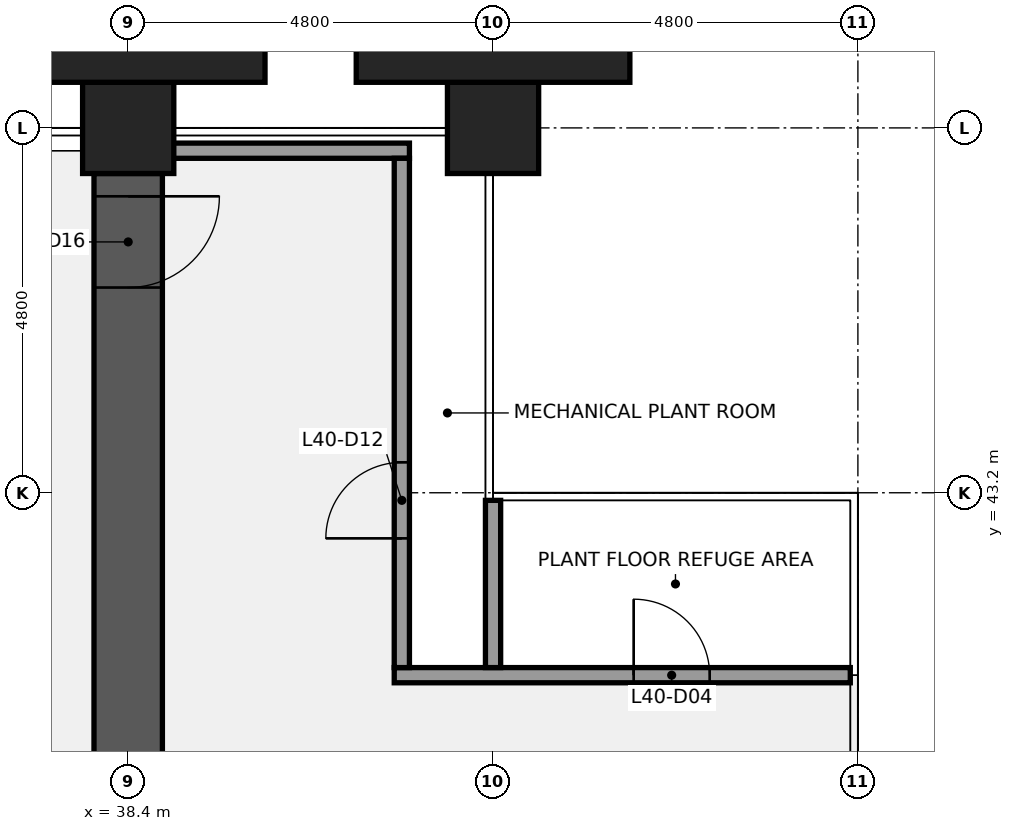
"""IFC4 building model, lengths in metres.
Left out: names, types, materials, properties, quantities, classifications, styles, units other than length and angle.
Written with IfcOpenShell. Run it as: python <this file> out.ifc"""

import sys

from ifc_helpers import new_model, si_unit, direction, frame, frame_2d, origin, origin_2d, place, context, subcontext, project, spatial, rectangle, extrude, element, fill, save


model = new_model("IFC4")
c1 = context("Model", 3, precision=1e-05, world=origin(), true_north=direction((0.0, 1.0)))
c2 = subcontext(c1, "Body", "Model", "MODEL_VIEW")
j1 = project(units=[si_unit("LENGTHUNIT", "METRE"), si_unit("PLANEANGLEUNIT", "RADIAN")], contexts=[c1])
p1 = place(None, origin())
s1 = spatial("IfcSite", under=j1, at=p1, CompositionType="ELEMENT")
p2 = place(p1, origin())
s2 = spatial("IfcBuilding", under=s1, at=p2, CompositionType="ELEMENT")
p3 = place(p2, frame((0.0, 0.0, 180.6)))
s3 = spatial("IfcBuildingStorey", under=s2, at=p3, CompositionType="ELEMENT", Elevation=180.6)
for number, where, z_axis, x_axis in (
    (1, (38.4, 48.0, 0.0), (0.0, 0.0, 1.0), (1.0, 0.0, 0.0)),
    (2, (43.2, 48.0, 0.0), (0.0, 0.0, 1.0), (1.0, 0.0, 0.0)),
):
    element("IfcColumn", number, at=place(p3, frame(where, z_axis=z_axis, x_axis=x_axis)), inside=s3, PredefinedType="COLUMN", context=c2, shape_type="SweptSolid", body=[
        extrude(rectangle(XDim=1.2, YDim=1.2, at=origin_2d()), origin(), (0.0, 0.0, 1.0), 12.6),
    ])
p4 = place(p3, frame((38.4, 38.4, 0.0), z_axis=(0.0, 0.0, 1.0), x_axis=(0.0, 1.0, 0.0)))
e3 = element("IfcWall", 3, at=p4, inside=s3, PredefinedType="SHEAR", context=c2, shape_type="SweptSolid", body=[
    extrude(rectangle(XDim=9.0, YDim=0.9, at=frame_2d((4.5, 0.0))), origin(), (0.0, 0.0, 1.0), 12.3),
])
p5 = place(p4, frame((7.5, 0.0, 0.0)))
e4 = element("IfcOpeningElement", 4, at=p5, cuts=e3, PredefinedType="OPENING", context=c2, shape_type="SweptSolid", body=[
    extrude(rectangle(XDim=1.2, YDim=2.1, at=frame_2d((0.6, 1.05))), frame((0.0, 0.46, 0.0), z_axis=(0.0, -1.0, 0.0), x_axis=(1.0, 0.0, 0.0)), (0.0, 0.0, 1.0), 0.92),
])
p6 = place(p3, frame((41.9, 40.8, 0.0), z_axis=(0.0, 0.0, 1.0), x_axis=(1.0, 0.0, 0.0)))
e5 = element("IfcWall", 5, at=p6, inside=s3, PredefinedType="PARTITIONING", context=c2, shape_type="SweptSolid", body=[
    extrude(rectangle(XDim=6.0, YDim=0.2, at=frame_2d((3.0, 0.0))), origin(), (0.0, 0.0, 1.0), 11.309),
])
p7 = place(p6, frame((3.15, 0.0, 0.0)))
e6 = element("IfcOpeningElement", 6, at=p7, cuts=e5, PredefinedType="OPENING", context=c2, shape_type="SweptSolid", body=[
    extrude(rectangle(XDim=1.0, YDim=2.1, at=frame_2d((0.5, 1.05))), frame((0.0, 0.11, 0.0), z_axis=(0.0, -1.0, 0.0), x_axis=(1.0, 0.0, 0.0)), (0.0, 0.0, 1.0), 0.22),
])
p8 = place(p3, frame((38.3, 47.7, 0.0), z_axis=(0.0, 0.0, 1.0), x_axis=(1.0, 0.0, 0.0)))
e7 = element("IfcWall", 7, at=p8, inside=s3, PredefinedType="PARTITIONING", context=c2, shape_type="SweptSolid", body=[
    extrude(rectangle(XDim=3.8, YDim=0.2, at=frame_2d((1.9, 0.0))), origin(), (0.0, 0.0, 1.0), 11.309),
])
p9 = place(p3, frame((42.0, 40.9, 0.0), z_axis=(0.0, 0.0, 1.0), x_axis=(0.0, 1.0, 0.0)))
e8 = element("IfcWall", 8, at=p9, inside=s3, PredefinedType="PARTITIONING", context=c2, shape_type="SweptSolid", body=[
    extrude(rectangle(XDim=6.7, YDim=0.2, at=frame_2d((3.35, 0.0))), origin(), (0.0, 0.0, 1.0), 11.309),
])
p10 = place(p9, frame((1.7, 0.0, 0.0)))
e9 = element("IfcOpeningElement", 9, at=p10, cuts=e8, PredefinedType="OPENING", context=c2, shape_type="SweptSolid", body=[
    extrude(rectangle(XDim=1.0, YDim=2.1, at=frame_2d((0.5, 1.05))), frame((0.0, 0.11, 0.0), z_axis=(0.0, -1.0, 0.0), x_axis=(1.0, 0.0, 0.0)), (0.0, 0.0, 1.0), 0.22),
])
p11 = place(p3, frame((43.2, 40.9, 0.0), z_axis=(0.0, 0.0, 1.0), x_axis=(0.0, 1.0, 0.0)))
e10 = element("IfcWall", 10, at=p11, inside=s3, PredefinedType="PARTITIONING", context=c2, shape_type="SweptSolid", body=[
    extrude(rectangle(XDim=2.2, YDim=0.2, at=frame_2d((1.1, 0.0))), origin(), (0.0, 0.0, 1.0), 11.309),
])
for number, where, z_axis, x_axis in (
    (11, (38.4, 49.05, 0.0), (0.0, 0.0, 1.0), (1.0, 0.0, 0.0)),
    (12, (43.2, 49.05, 0.0), (0.0, 0.0, 1.0), (1.0, 0.0, 0.0)),
):
    element("IfcColumn", number, at=place(p3, frame(where, z_axis=z_axis, x_axis=x_axis)), inside=s3, PredefinedType="PILASTER", context=c2, shape_type="SweptSolid", body=[
        extrude(rectangle(XDim=3.6, YDim=0.9, at=origin_2d()), origin(), (0.0, 0.0, 1.0), 12.6),
    ])
p12 = place(p7, origin())
e13 = element("IfcDoor", 13, at=p12, inside=s3, OperationType="SINGLE_SWING_LEFT", PredefinedType="DOOR", context=c2, shape_type="SweptSolid", body=[
    extrude(rectangle(XDim=1.0, YDim=2.1, at=frame_2d((0.5, 1.05))), frame((0.0, 0.025, 0.0), z_axis=(0.0, -1.0, 0.0), x_axis=(1.0, 0.0, 0.0)), (0.0, 0.0, 1.0), 0.05),
])
fill(e6, e13)
p13 = place(p10, origin())
e14 = element("IfcDoor", 14, at=p13, inside=s3, OperationType="SINGLE_SWING_LEFT", PredefinedType="DOOR", context=c2, shape_type="SweptSolid", body=[
    extrude(rectangle(XDim=1.0, YDim=2.1, at=frame_2d((0.5, 1.05))), frame((0.0, 0.025, 0.0), z_axis=(0.0, -1.0, 0.0), x_axis=(1.0, 0.0, 0.0)), (0.0, 0.0, 1.0), 0.05),
])
fill(e9, e14)
p14 = place(p5, origin())
e15 = element("IfcDoor", 15, at=p14, inside=s3, OperationType="SINGLE_SWING_RIGHT", PredefinedType="DOOR", context=c2, shape_type="SweptSolid", body=[
    extrude(rectangle(XDim=1.2, YDim=2.1, at=frame_2d((0.6, 1.05))), frame((0.0, 0.025, 0.0), z_axis=(0.0, -1.0, 0.0), x_axis=(1.0, 0.0, 0.0)), (0.0, 0.0, 1.0), 0.05),
])
fill(e4, e15)
save(model, sys.argv[1])
